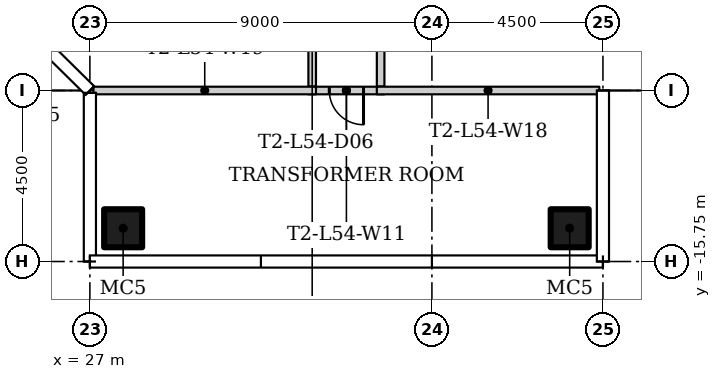
"""IFC4 building model, lengths in metres.
Left out: names, types, materials, properties, quantities, classifications, styles, units other than length and angle.
Written with IfcOpenShell. Run it as: python <this file> out.ifc"""

import sys

from ifc_helpers import new_model, si_unit, direction, frame, frame_2d, origin, origin_2d, place, context, subcontext, project, spatial, rectangle, hollow_rectangle, extrude, element, fill, save


model = new_model("IFC4")
c1 = context("Model", 3, precision=1e-05, world=origin(), true_north=direction((0.0, 1.0)))
c2 = subcontext(c1, "Body", "Model", "MODEL_VIEW")
j1 = project(units=[si_unit("LENGTHUNIT", "METRE"), si_unit("PLANEANGLEUNIT", "RADIAN")], contexts=[c1])
p1 = place(None, origin())
s1 = spatial("IfcSite", under=j1, at=p1, CompositionType="ELEMENT")
p2 = place(p1, origin())
s2 = spatial("IfcBuilding", under=s1, at=p2, CompositionType="ELEMENT")
p3 = place(p2, frame((0.0, 0.0, 225.6)))
s3 = spatial("IfcBuildingStorey", under=s2, at=p3, CompositionType="ELEMENT", Elevation=225.6)
for number, where in (
    (1, (39.625, -14.875, 0.0)),
    (2, (27.875, -14.875, 0.0)),
):
    element("IfcColumn", number, at=place(p3, frame(where)), inside=s3, PredefinedType="COLUMN", context=c2, shape_type="SweptSolid", body=[
        extrude(hollow_rectangle(XDim=1.0, YDim=1.0, WallThickness=0.04, at=origin_2d()), origin(), (0.0, 0.0, 1.0), 4.45),
    ])
p4 = place(p3, frame((32.85, -11.15, 0.0), z_axis=(0.0, 0.0, 1.0), x_axis=(0.0, 1.0, 0.0)))
e3 = element("IfcWall", 3, at=p4, inside=s3, PredefinedType="PARTITIONING", context=c2, shape_type="SweptSolid", body=[
    extrude(rectangle(XDim=4.3, YDim=0.2, at=frame_2d((2.15, 0.0))), origin(), (0.0, 0.0, 1.0), 4.45),
])
p5 = place(p4, frame((1.4, 0.0, 0.0)))
e4 = element("IfcOpeningElement", 4, at=p5, cuts=e3, PredefinedType="OPENING", context=c2, shape_type="SweptSolid", body=[
    extrude(rectangle(XDim=1.5, YDim=2.4, at=frame_2d((0.75, 1.2))), frame((0.0, 0.11, 0.0), z_axis=(0.0, -1.0, 0.0), x_axis=(1.0, 0.0, 0.0)), (0.0, 0.0, 1.0), 0.22),
])
p6 = place(p3, frame((34.65, -0.05, 0.0), z_axis=(0.0, 0.0, 1.0), x_axis=(0.0, -1.0, 0.0)))
e5 = element("IfcWall", 5, at=p6, inside=s3, PredefinedType="PARTITIONING", context=c2, shape_type="SweptSolid", body=[
    extrude(rectangle(XDim=11.1, YDim=0.2, at=frame_2d((5.55, 0.0))), origin(), (0.0, 0.0, 1.0), 4.45),
])
p7 = place(p6, frame((8.2, 0.0, 0.0)))
e6 = element("IfcOpeningElement", 6, at=p7, cuts=e5, PredefinedType="OPENING", context=c2, shape_type="SweptSolid", body=[
    extrude(rectangle(XDim=1.5, YDim=2.4, at=frame_2d((0.75, 1.2))), frame((0.0, 0.11, 0.0), z_axis=(0.0, -1.0, 0.0), x_axis=(1.0, 0.0, 0.0)), (0.0, 0.0, 1.0), 0.22),
])
p8 = place(p6, frame((2.85, 0.0, 0.0)))
e7 = element("IfcOpeningElement", 7, at=p8, cuts=e5, PredefinedType="OPENING", context=c2, shape_type="SweptSolid", body=[
    extrude(rectangle(XDim=0.9, YDim=2.1, at=frame_2d((0.45, 1.05))), frame((0.0, 0.11, 0.0), z_axis=(0.0, -1.0, 0.0), x_axis=(1.0, 0.0, 0.0)), (0.0, 0.0, 1.0), 0.22),
])
p9 = place(p3, frame((34.75, -11.25, 0.0), z_axis=(0.0, 0.0, 1.0), x_axis=(-1.0, 0.0, 0.0)))
e8 = element("IfcWall", 8, at=p9, inside=s3, PredefinedType="PARTITIONING", context=c2, shape_type="SweptSolid", body=[
    extrude(rectangle(XDim=2.001, YDim=0.2, at=frame_2d((1.0, 0.0))), origin(), (0.0, 0.0, 1.0), 4.45),
])
p10 = place(p9, frame((0.55, 0.0, 0.0)))
e9 = element("IfcOpeningElement", 9, at=p10, cuts=e8, PredefinedType="OPENING", context=c2, shape_type="SweptSolid", body=[
    extrude(rectangle(XDim=0.9, YDim=2.4, at=frame_2d((0.45, 1.2))), frame((0.0, 0.11, 0.0), z_axis=(0.0, -1.0, 0.0), x_axis=(1.0, 0.0, 0.0)), (0.0, 0.0, 1.0), 0.22),
])
for number, where in (
    (10, (34.55, -11.25, 0.0)),
    (11, (27.095, -11.25, 0.0)),
):
    element("IfcWall", number, at=place(p3, frame(where)), inside=s3, PredefinedType="PARTITIONING", context=c2, shape_type="SweptSolid", body=[
        extrude(rectangle(XDim=5.855, YDim=0.2, at=frame_2d((2.927, 0.0))), origin(), (0.0, 0.0, 1.0), 4.45),
    ])
p11 = place(p10, origin())
e12 = element("IfcDoor", 12, at=p11, inside=s3, OperationType="SINGLE_SWING_LEFT", PredefinedType="DOOR", context=c2, shape_type="SweptSolid", body=[
    extrude(rectangle(XDim=0.9, YDim=2.4, at=frame_2d((0.45, 1.2))), frame((0.0, 0.025, 0.0), z_axis=(0.0, -1.0, 0.0), x_axis=(1.0, 0.0, 0.0)), (0.0, 0.0, 1.0), 0.05),
])
fill(e9, e12)
save(model, sys.argv[1])
